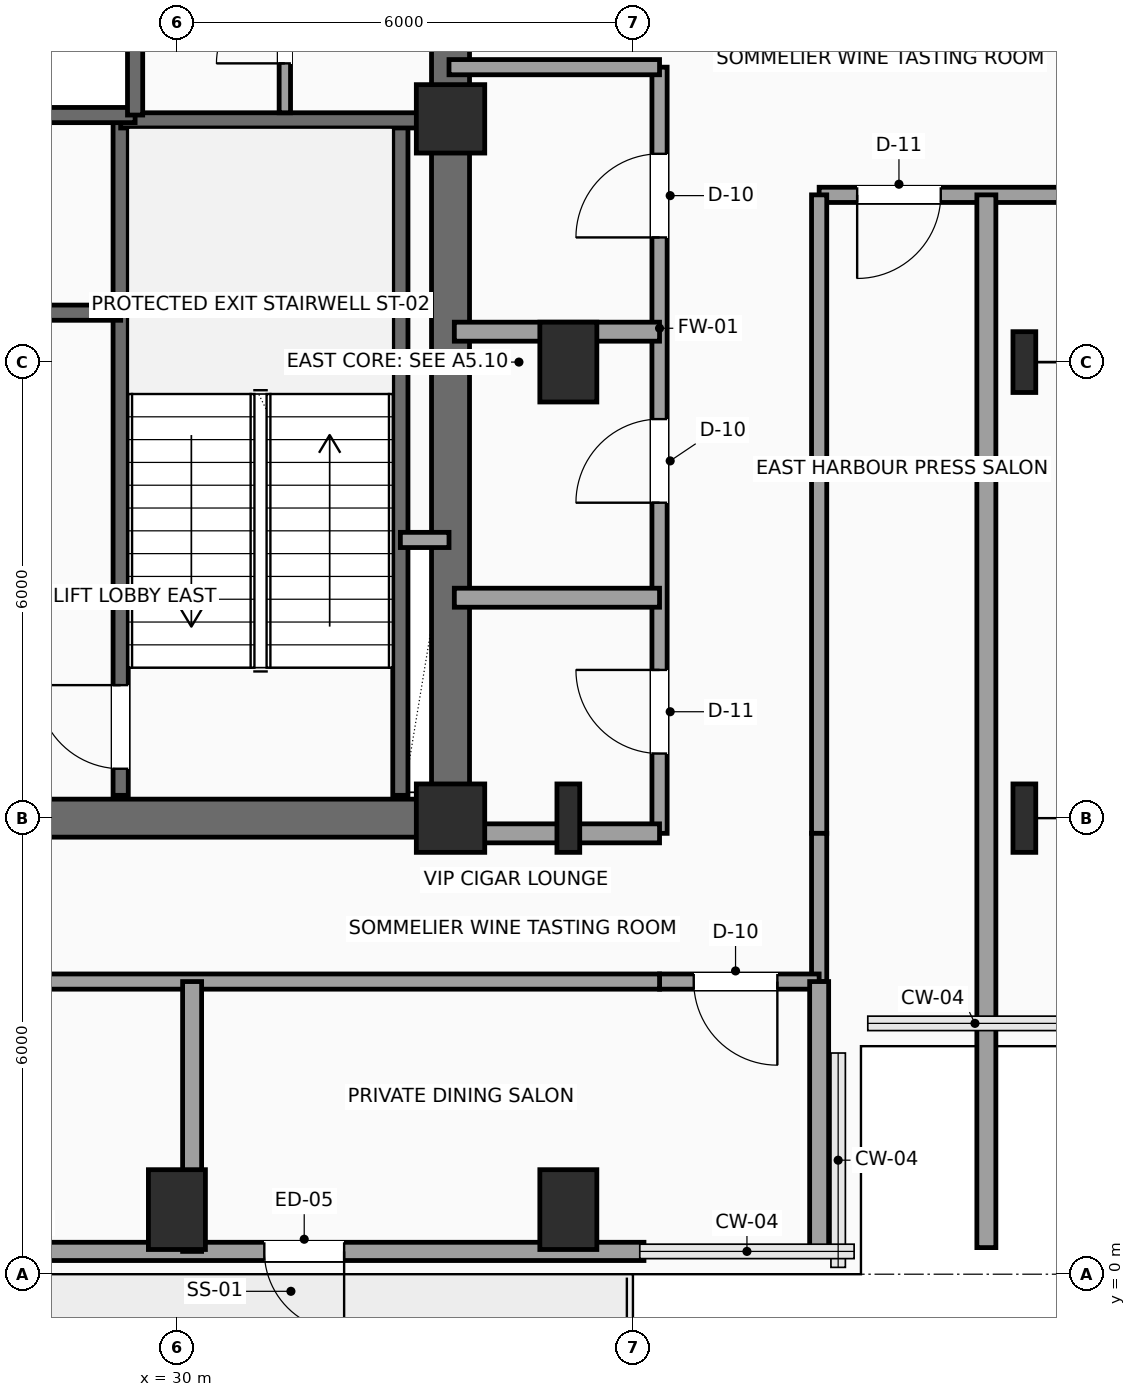
"""IFC4 building model, lengths in metres.
Left out: names, types, materials, properties, quantities, classifications, styles, units other than length and angle.
Written with IfcOpenShell. Run it as: python <this file> out.ifc"""

import sys

from ifc_helpers import new_model, si_unit, direction, frame, frame_2d, origin, origin_2d, place, context, subcontext, project, spatial, rectangle, i_section, extrude, element, fill, save


model = new_model("IFC4")
c1 = context("Model", 3, precision=1e-05, world=origin(), true_north=direction((0.0, 1.0)))
c2 = subcontext(c1, "Body", "Model", "MODEL_VIEW")
j1 = project(units=[si_unit("LENGTHUNIT", "METRE"), si_unit("PLANEANGLEUNIT", "RADIAN")], contexts=[c1])
p1 = place(None, origin())
s1 = spatial("IfcSite", under=j1, at=p1, CompositionType="ELEMENT")
p2 = place(p1, origin())
s2 = spatial("IfcBuilding", under=s1, at=p2, CompositionType="ELEMENT")
p3 = place(p2, frame((0.0, 0.0, 184.2)))
s3 = spatial("IfcBuildingStorey", under=s2, at=p3, CompositionType="ELEMENT", Elevation=184.2)
for number, where, z_axis, x_axis in (
    (1, (33.6, 6.0, 0.0), (0.0, 0.0, 1.0), (1.0, 0.0, 0.0)),
    (2, (33.6, 15.2, 0.0), (0.0, 0.0, 1.0), (1.0, 0.0, 0.0)),
):
    element("IfcColumn", number, at=place(p3, frame(where, z_axis=z_axis, x_axis=x_axis)), inside=s3, PredefinedType="COLUMN", context=c2, shape_type="SweptSolid", body=[
        extrude(rectangle(XDim=0.9, YDim=0.9, at=origin_2d()), origin(), (0.0, 0.0, 1.0), 3.75),
    ])
for number, where, z_axis, x_axis in (
    (3, (30.0, 0.85, 0.0), (0.0, 0.0, 1.0), (1.0, 0.0, 0.0)),
    (4, (35.15, 0.85, 0.0), (0.0, 0.0, 1.0), (1.0, 0.0, 0.0)),
):
    element("IfcColumn", number, at=place(p3, frame(where, z_axis=z_axis, x_axis=x_axis)), inside=s3, PredefinedType="COLUMN", context=c2, shape_type="SweptSolid", body=[
        extrude(rectangle(XDim=0.75, YDim=1.05, at=origin_2d()), origin(), (0.0, 0.0, 1.0), 3.75),
    ])
p4 = place(p3, frame((35.15, 6.0, 0.0), z_axis=(0.0, 0.0, 1.0), x_axis=(1.0, 0.0, 0.0)))
e5 = element("IfcColumn", 5, at=p4, inside=s3, PredefinedType="COLUMN", context=c2, shape_type="SweptSolid", body=[
    extrude(i_section(OverallWidth=0.3, OverallDepth=0.9, WebThickness=0.019, FlangeThickness=0.035, FilletRadius=0.03, at=origin_2d()), origin(), (0.0, 0.0, 1.0), 3.75),
])
p5 = place(p3, frame((35.15, 12.0, 0.0), z_axis=(0.0, 0.0, 1.0), x_axis=(1.0, 0.0, 0.0)))
e6 = element("IfcColumn", 6, at=p5, inside=s3, PredefinedType="COLUMN", context=c2, shape_type="SweptSolid", body=[
    extrude(rectangle(XDim=0.75, YDim=1.05, at=origin_2d()), origin(), (0.0, 0.0, 1.0), 3.75),
])
p6 = place(p3, frame((41.15, 6.0, 0.0), z_axis=(0.0, 0.0, 1.0), x_axis=(1.0, 0.0, 0.0)))
e7 = element("IfcColumn", 7, at=p6, inside=s3, PredefinedType="COLUMN", context=c2, shape_type="SweptSolid", body=[
    extrude(i_section(OverallWidth=0.3, OverallDepth=0.9, WebThickness=0.019, FlangeThickness=0.035, FilletRadius=0.03, at=origin_2d()), origin(), (0.0, 0.0, 1.0), 3.75),
])
p7 = place(p3, frame((41.15, 12.0, 0.0), z_axis=(0.0, 0.0, 1.0), x_axis=(1.0, 0.0, 0.0)))
e8 = element("IfcColumn", 8, at=p7, inside=s3, PredefinedType="COLUMN", context=c2, shape_type="SweptSolid", body=[
    extrude(i_section(OverallWidth=0.3, OverallDepth=0.8, WebThickness=0.018, FlangeThickness=0.033, FilletRadius=0.03, at=origin_2d()), origin(), (0.0, 0.0, 1.0), 3.75),
])
p8 = place(p3, frame((36.145, 0.3, 0.0), z_axis=(0.0, 0.0, 1.0), x_axis=(-1.0, 0.0, 0.0)))
e9 = element("IfcWall", 9, at=p8, inside=s3, PredefinedType="SOLIDWALL", context=c2, shape_type="SweptSolid", body=[
    extrude(rectangle(XDim=9.29, YDim=0.24, at=frame_2d((4.645, 0.0))), origin(), (0.0, 0.0, 1.0), 3.54),
])
p9 = place(p8, frame((3.945, 0.0, 0.0)))
e10 = element("IfcOpeningElement", 10, at=p9, cuts=e9, PredefinedType="OPENING", context=c2, shape_type="SweptSolid", body=[
    extrude(rectangle(XDim=1.05, YDim=2.2, at=frame_2d((0.525, 1.1))), frame((0.0, 0.13, 0.0), z_axis=(0.0, -1.0, 0.0), x_axis=(1.0, 0.0, 0.0)), (0.0, 0.0, 1.0), 0.26),
])
p10 = place(p3, frame((24.0, 6.0, 0.0), z_axis=(0.0, 0.0, 1.0), x_axis=(1.0, 0.0, 0.0)))
e11 = element("IfcWall", 11, at=p10, inside=s3, PredefinedType="SHEAR", context=c2, shape_type="SweptSolid", body=[
    extrude(rectangle(XDim=9.6, YDim=0.5, at=frame_2d((4.8, 0.0))), origin(), (0.0, 0.0, 1.0), 3.54),
])
p11 = place(p3, frame((33.6, 6.0, 0.0), z_axis=(0.0, 0.0, 1.0), x_axis=(0.0, 1.0, 0.0)))
e12 = element("IfcWall", 12, at=p11, inside=s3, PredefinedType="SHEAR", context=c2, shape_type="SweptSolid", body=[
    extrude(rectangle(XDim=12.0, YDim=0.5, at=frame_2d((6.0, 0.0))), origin(), (0.0, 0.0, 1.0), 3.54),
])
p12 = place(p11, frame((10.15, 0.0, 0.0)))
e13 = element("IfcOpeningElement", 13, at=p12, cuts=e12, PredefinedType="OPENING", context=c2, shape_type="SweptSolid", body=[
    extrude(rectangle(XDim=0.9, YDim=2.15, at=frame_2d((0.45, 1.075))), frame((0.0, 0.26, 0.0), z_axis=(0.0, -1.0, 0.0), x_axis=(1.0, 0.0, 0.0)), (0.0, 0.0, 1.0), 0.52),
])
p13 = place(p3, frame((29.26, 6.3, 0.0), z_axis=(0.0, 0.0, 1.0), x_axis=(0.0, 1.0, 0.0)))
e14 = element("IfcWall", 14, at=p13, inside=s3, PredefinedType="SHEAR", context=c2, shape_type="SweptSolid", body=[
    extrude(rectangle(XDim=8.88, YDim=0.2, at=frame_2d((4.44, 0.0))), origin(), (0.0, 0.0, 1.0), 3.54),
])
p14 = place(p13, frame((0.35, 0.0, 0.0)))
e15 = element("IfcOpeningElement", 15, at=p14, cuts=e14, PredefinedType="OPENING", context=c2, shape_type="SweptSolid", body=[
    extrude(rectangle(XDim=1.1, YDim=2.2, at=frame_2d((0.55, 1.1))), frame((0.0, 0.11, 0.0), z_axis=(0.0, -1.0, 0.0), x_axis=(1.0, 0.0, 0.0)), (0.0, 0.0, 1.0), 0.22),
])
p15 = place(p3, frame((32.94, 6.3, 0.0), z_axis=(0.0, 0.0, 1.0), x_axis=(0.0, 1.0, 0.0)))
e16 = element("IfcWall", 16, at=p15, inside=s3, PredefinedType="SHEAR", context=c2, shape_type="SweptSolid", body=[
    extrude(rectangle(XDim=8.88, YDim=0.2, at=frame_2d((4.44, 0.0))), origin(), (0.0, 0.0, 1.0), 3.54),
])
p16 = place(p3, frame((29.26, 15.18, 0.0), z_axis=(0.0, 0.0, 1.0), x_axis=(1.0, 0.0, 0.0)))
e17 = element("IfcWall", 17, at=p16, inside=s3, PredefinedType="SHEAR", context=c2, shape_type="SweptSolid", body=[
    extrude(rectangle(XDim=4.04, YDim=0.2, at=frame_2d((2.02, 0.0))), origin(), (0.0, 0.0, 1.0), 3.54),
])
p17 = place(p3, frame((26.42, 12.65, 0.0), z_axis=(0.0, 0.0, 1.0), x_axis=(1.0, 0.0, 0.0)))
e18 = element("IfcWall", 18, at=p17, inside=s3, PredefinedType="SHEAR", context=c2, shape_type="SweptSolid", body=[
    extrude(rectangle(XDim=2.84, YDim=0.2, at=frame_2d((1.42, 0.0))), origin(), (0.0, 0.0, 1.0), 3.54),
])
p18 = place(p17, frame((0.9, 0.0, 0.0)))
e19 = element("IfcOpeningElement", 19, at=p18, cuts=e18, PredefinedType="OPENING", context=c2, shape_type="SweptSolid", body=[
    extrude(rectangle(XDim=0.9, YDim=2.15, at=frame_2d((0.45, 1.075))), frame((0.0, 0.11, 0.0), z_axis=(0.0, -1.0, 0.0), x_axis=(1.0, 0.0, 0.0)), (0.0, 0.0, 1.0), 0.22),
])
p19 = place(p3, frame((32.94, 9.66, 0.0), z_axis=(0.0, 0.0, 1.0), x_axis=(1.0, 0.0, 0.0)))
e20 = element("IfcWall", 20, at=p19, inside=s3, PredefinedType="SOLIDWALL", context=c2, shape_type="SweptSolid", body=[
    extrude(rectangle(XDim=0.64, YDim=0.2, at=frame_2d((0.32, 0.0))), origin(), (0.0, 0.0, 1.0), 3.54),
])
p20 = place(p3, frame((24.25, 15.25, 0.0), z_axis=(0.0, 0.0, 1.0), x_axis=(1.0, 0.0, 0.0)))
e21 = element("IfcWall", 21, at=p20, inside=s3, PredefinedType="SHEAR", context=c2, shape_type="SweptSolid", body=[
    extrude(rectangle(XDim=5.2, YDim=0.2, at=frame_2d((2.6, 0.0))), origin(), (0.0, 0.0, 1.0), 3.54),
])
p21 = place(p3, frame((29.45, 15.25, 0.0), z_axis=(0.0, 0.0, 1.0), x_axis=(0.0, 1.0, 0.0)))
e22 = element("IfcWall", 22, at=p21, inside=s3, PredefinedType="SHEAR", context=c2, shape_type="SweptSolid", body=[
    extrude(rectangle(XDim=2.45, YDim=0.2, at=frame_2d((1.225, 0.0))), origin(), (0.0, 0.0, 1.0), 3.54),
])
p22 = place(p3, frame((31.42, 15.28, 0.0), z_axis=(0.0, 0.0, 1.0), x_axis=(0.0, 1.0, 0.0)))
e23 = element("IfcWall", 23, at=p22, inside=s3, PredefinedType="PARTITIONING", context=c2, shape_type="SweptSolid", body=[
    extrude(rectangle(XDim=2.42, YDim=0.15, at=frame_2d((1.21, 0.0))), origin(), (0.0, 0.0, 1.0), 3.54),
])
p23 = place(p22, frame((0.65, 0.0, 0.0)))
e24 = element("IfcOpeningElement", 24, at=p23, cuts=e23, PredefinedType="OPENING", context=c2, shape_type="SweptSolid", body=[
    extrude(rectangle(XDim=0.9, YDim=2.15, at=frame_2d((0.45, 1.075))), frame((0.0, 0.085, 0.0), z_axis=(0.0, -1.0, 0.0), x_axis=(1.0, 0.0, 0.0)), (0.0, 0.0, 1.0), 0.17),
])
p24 = place(p3, frame((36.35, 5.8, 0.0), z_axis=(0.0, 0.0, 1.0), x_axis=(0.0, 1.0, 0.0)))
e25 = element("IfcWall", 25, at=p24, inside=s3, PredefinedType="SOLIDWALL", context=c2, shape_type="SweptSolid", body=[
    extrude(rectangle(XDim=10.08, YDim=0.2, at=frame_2d((5.04, 0.0))), origin(), (0.0, 0.0, 1.0), 3.54),
])
p25 = place(p24, frame((1.05, 0.0, 0.0)))
e26 = element("IfcOpeningElement", 26, at=p25, cuts=e25, PredefinedType="OPENING", context=c2, shape_type="SweptSolid", body=[
    extrude(rectangle(XDim=1.1, YDim=2.25, at=frame_2d((0.55, 1.125))), frame((0.0, 0.11, 0.0), z_axis=(0.0, -1.0, 0.0), x_axis=(1.0, 0.0, 0.0)), (0.0, 0.0, 1.0), 0.22),
])
p26 = place(p24, frame((4.35, 0.0, 0.0)))
e27 = element("IfcOpeningElement", 27, at=p26, cuts=e25, PredefinedType="OPENING", context=c2, shape_type="SweptSolid", body=[
    extrude(rectangle(XDim=1.1, YDim=2.25, at=frame_2d((0.55, 1.125))), frame((0.0, 0.11, 0.0), z_axis=(0.0, -1.0, 0.0), x_axis=(1.0, 0.0, 0.0)), (0.0, 0.0, 1.0), 0.22),
])
p27 = place(p24, frame((7.84, 0.0, 0.0)))
e28 = element("IfcOpeningElement", 28, at=p27, cuts=e25, PredefinedType="OPENING", context=c2, shape_type="SweptSolid", body=[
    extrude(rectangle(XDim=1.1, YDim=2.25, at=frame_2d((0.55, 1.125))), frame((0.0, 0.11, 0.0), z_axis=(0.0, -1.0, 0.0), x_axis=(1.0, 0.0, 0.0)), (0.0, 0.0, 1.0), 0.22),
])
p28 = place(p3, frame((36.35, 15.88, 0.0), z_axis=(0.0, 0.0, 1.0), x_axis=(-1.0, 0.0, 0.0)))
e29 = element("IfcWall", 29, at=p28, inside=s3, PredefinedType="SOLIDWALL", context=c2, shape_type="SweptSolid", body=[
    extrude(rectangle(XDim=2.77, YDim=0.2, at=frame_2d((1.385, 0.0))), origin(), (0.0, 0.0, 1.0), 3.54),
])
p29 = place(p3, frame((41.7, 14.2, 0.0), z_axis=(0.0, 0.0, 1.0), x_axis=(-1.0, 0.0, 0.0)))
e30 = element("IfcWall", 30, at=p29, inside=s3, PredefinedType="SOLIDWALL", context=c2, shape_type="SweptSolid", body=[
    extrude(rectangle(XDim=3.25, YDim=0.2, at=frame_2d((1.625, 0.0))), origin(), (0.0, 0.0, 1.0), 3.54),
])
p30 = place(p29, frame((1.65, 0.0, 0.0)))
e31 = element("IfcOpeningElement", 31, at=p30, cuts=e30, PredefinedType="OPENING", context=c2, shape_type="SweptSolid", body=[
    extrude(rectangle(XDim=1.1, YDim=2.25, at=frame_2d((0.55, 1.125))), frame((0.0, 0.11, 0.0), z_axis=(0.0, -1.0, 0.0), x_axis=(1.0, 0.0, 0.0)), (0.0, 0.0, 1.0), 0.22),
])
p31 = place(p3, frame((38.45, 14.2, 0.0), z_axis=(0.0, 0.0, 1.0), x_axis=(0.0, -1.0, 0.0)))
e32 = element("IfcWall", 32, at=p31, inside=s3, PredefinedType="SOLIDWALL", context=c2, shape_type="SweptSolid", body=[
    extrude(rectangle(XDim=8.4, YDim=0.2, at=frame_2d((4.2, 0.0))), origin(), (0.0, 0.0, 1.0), 3.54),
])
p32 = place(p3, frame((38.45, 5.8, 0.0), z_axis=(0.0, 0.0, 1.0), x_axis=(0.0, -1.0, 0.0)))
e33 = element("IfcWall", 33, at=p32, inside=s3, PredefinedType="SOLIDWALL", context=c2, shape_type="SweptSolid", body=[
    extrude(rectangle(XDim=1.95, YDim=0.2, at=frame_2d((0.975, 0.0))), origin(), (0.0, 0.0, 1.0), 3.54),
])
p33 = place(p3, frame((38.45, 3.85, 0.0), z_axis=(0.0, 0.0, 1.0), x_axis=(-1.0, 0.0, 0.0)))
e34 = element("IfcWall", 34, at=p33, inside=s3, PredefinedType="SOLIDWALL", context=c2, shape_type="SweptSolid", body=[
    extrude(rectangle(XDim=2.1, YDim=0.2, at=frame_2d((1.05, 0.0))), origin(), (0.0, 0.0, 1.0), 3.54),
])
p34 = place(p33, frame((0.55, 0.0, 0.0)))
e35 = element("IfcOpeningElement", 35, at=p34, cuts=e34, PredefinedType="OPENING", context=c2, shape_type="SweptSolid", body=[
    extrude(rectangle(XDim=1.1, YDim=2.25, at=frame_2d((0.55, 1.125))), frame((0.0, 0.11, 0.0), z_axis=(0.0, -1.0, 0.0), x_axis=(1.0, 0.0, 0.0)), (0.0, 0.0, 1.0), 0.22),
])
p35 = place(p3, frame((36.35, 3.85, 0.0), z_axis=(0.0, 0.0, 1.0), x_axis=(-1.0, 0.0, 0.0)))
e36 = element("IfcWall", 36, at=p35, inside=s3, PredefinedType="SOLIDWALL", context=c2, shape_type="SweptSolid", body=[
    extrude(rectangle(XDim=12.4, YDim=0.2, at=frame_2d((6.2, 0.0))), origin(), (0.0, 0.0, 1.0), 3.54),
])
p36 = place(p35, frame((8.775, 0.0, 0.0)))
e37 = element("IfcOpeningElement", 37, at=p36, cuts=e36, PredefinedType="OPENING", context=c2, shape_type="SweptSolid", body=[
    extrude(rectangle(XDim=1.1, YDim=2.25, at=frame_2d((0.55, 1.125))), frame((0.0, 0.11, 0.0), z_axis=(0.0, -1.0, 0.0), x_axis=(1.0, 0.0, 0.0)), (0.0, 0.0, 1.0), 0.22),
])
for number, where, z_axis, x_axis in (
    (38, (30.2, 0.3, 0.0), (0.0, 0.0, 1.0), (0.0, 1.0, 0.0)),
    (39, (38.45, 0.3, 0.0), (0.0, 0.0, 1.0), (0.0, 1.0, 0.0)),
):
    element("IfcWall", number, at=place(p3, frame(where, z_axis=z_axis, x_axis=x_axis)), inside=s3, PredefinedType="PARTITIONING", context=c2, shape_type="SweptSolid", body=[
        extrude(rectangle(XDim=3.55, YDim=0.25, at=frame_2d((1.775, 0.0))), origin(), (0.0, 0.0, 1.0), 3.54),
    ])
for number, where, z_axis, x_axis in (
    (40, (33.65, 5.8, 0.0), (0.0, 0.0, 1.0), (1.0, 0.0, 0.0)),
    (41, (33.65, 8.9, 0.0), (0.0, 0.0, 1.0), (1.0, 0.0, 0.0)),
):
    element("IfcWall", number, at=place(p3, frame(where, z_axis=z_axis, x_axis=x_axis)), inside=s3, PredefinedType="PARTITIONING", context=c2, shape_type="SweptSolid", body=[
        extrude(rectangle(XDim=2.7, YDim=0.25, at=frame_2d((1.35, 0.0))), origin(), (0.0, 0.0, 1.0), 3.132),
    ])
p37 = place(p3, frame((33.65, 12.4, 0.0), z_axis=(0.0, 0.0, 1.0), x_axis=(1.0, 0.0, 0.0)))
e42 = element("IfcWall", 42, at=p37, inside=s3, PredefinedType="PARTITIONING", context=c2, shape_type="SweptSolid", body=[
    extrude(rectangle(XDim=2.7, YDim=0.25, at=frame_2d((1.35, 0.0))), origin(), (0.0, 0.0, 1.0), 3.54),
])
p38 = place(p3, frame((40.65, 0.35, 0.0), z_axis=(0.0, 0.0, 1.0), x_axis=(0.0, 1.0, 0.0)))
e43 = element("IfcWall", 43, at=p38, inside=s3, PredefinedType="PARTITIONING", context=c2, shape_type="SweptSolid", body=[
    extrude(rectangle(XDim=13.85, YDim=0.25, at=frame_2d((6.925, 0.0))), origin(), (0.0, 0.0, 1.0), 3.54),
])
p39 = place(p9, origin())
e44 = element("IfcDoor", 44, at=p39, inside=s3, OperationType="SINGLE_SWING_LEFT", PredefinedType="DOOR", context=c2, shape_type="SweptSolid", body=[
    extrude(rectangle(XDim=1.05, YDim=2.2, at=frame_2d((0.525, 1.1))), frame((0.0, 0.025, 0.0), z_axis=(0.0, -1.0, 0.0), x_axis=(1.0, 0.0, 0.0)), (0.0, 0.0, 1.0), 0.05),
])
fill(e10, e44)
p40 = place(p14, origin())
e45 = element("IfcDoor", 45, at=p40, inside=s3, OperationType="SINGLE_SWING_RIGHT", PredefinedType="DOOR", context=c2, shape_type="SweptSolid", body=[
    extrude(rectangle(XDim=1.1, YDim=2.2, at=frame_2d((0.55, 1.1))), frame((0.0, 0.025, 0.0), z_axis=(0.0, -1.0, 0.0), x_axis=(1.0, 0.0, 0.0)), (0.0, 0.0, 1.0), 0.05),
])
fill(e15, e45)
p41 = place(p23, origin())
e46 = element("IfcDoor", 46, at=p41, inside=s3, OperationType="SINGLE_SWING_LEFT", PredefinedType="DOOR", context=c2, shape_type="SweptSolid", body=[
    extrude(rectangle(XDim=0.9, YDim=2.15, at=frame_2d((0.45, 1.075))), frame((0.0, 0.025, 0.0), z_axis=(0.0, -1.0, 0.0), x_axis=(1.0, 0.0, 0.0)), (0.0, 0.0, 1.0), 0.05),
])
fill(e24, e46)
p42 = place(p25, origin())
e47 = element("IfcDoor", 47, at=p42, inside=s3, OperationType="SINGLE_SWING_RIGHT", PredefinedType="DOOR", context=c2, shape_type="SweptSolid", body=[
    extrude(rectangle(XDim=1.1, YDim=2.25, at=frame_2d((0.55, 1.125))), frame((0.0, 0.025, 0.0), z_axis=(0.0, -1.0, 0.0), x_axis=(1.0, 0.0, 0.0)), (0.0, 0.0, 1.0), 0.05),
])
fill(e26, e47)
p43 = place(p26, origin())
e48 = element("IfcDoor", 48, at=p43, inside=s3, OperationType="SINGLE_SWING_LEFT", PredefinedType="DOOR", context=c2, shape_type="SweptSolid", body=[
    extrude(rectangle(XDim=1.1, YDim=2.25, at=frame_2d((0.55, 1.125))), frame((0.0, 0.025, 0.0), z_axis=(0.0, -1.0, 0.0), x_axis=(1.0, 0.0, 0.0)), (0.0, 0.0, 1.0), 0.05),
])
fill(e27, e48)
p44 = place(p27, origin())
e49 = element("IfcDoor", 49, at=p44, inside=s3, OperationType="SINGLE_SWING_LEFT", PredefinedType="DOOR", context=c2, shape_type="SweptSolid", body=[
    extrude(rectangle(XDim=1.1, YDim=2.25, at=frame_2d((0.55, 1.125))), frame((0.0, 0.025, 0.0), z_axis=(0.0, -1.0, 0.0), x_axis=(1.0, 0.0, 0.0)), (0.0, 0.0, 1.0), 0.05),
])
fill(e28, e49)
p45 = place(p30, origin())
e50 = element("IfcDoor", 50, at=p45, inside=s3, OperationType="SINGLE_SWING_RIGHT", PredefinedType="DOOR", context=c2, shape_type="SweptSolid", body=[
    extrude(rectangle(XDim=1.1, YDim=2.25, at=frame_2d((0.55, 1.125))), frame((0.0, 0.025, 0.0), z_axis=(0.0, -1.0, 0.0), x_axis=(1.0, 0.0, 0.0)), (0.0, 0.0, 1.0), 0.05),
])
fill(e31, e50)
p46 = place(p34, origin())
e51 = element("IfcDoor", 51, at=p46, inside=s3, OperationType="SINGLE_SWING_LEFT", PredefinedType="DOOR", context=c2, shape_type="SweptSolid", body=[
    extrude(rectangle(XDim=1.1, YDim=2.25, at=frame_2d((0.55, 1.125))), frame((0.0, 0.025, 0.0), z_axis=(0.0, -1.0, 0.0), x_axis=(1.0, 0.0, 0.0)), (0.0, 0.0, 1.0), 0.05),
])
fill(e35, e51)
save(model, sys.argv[1])
